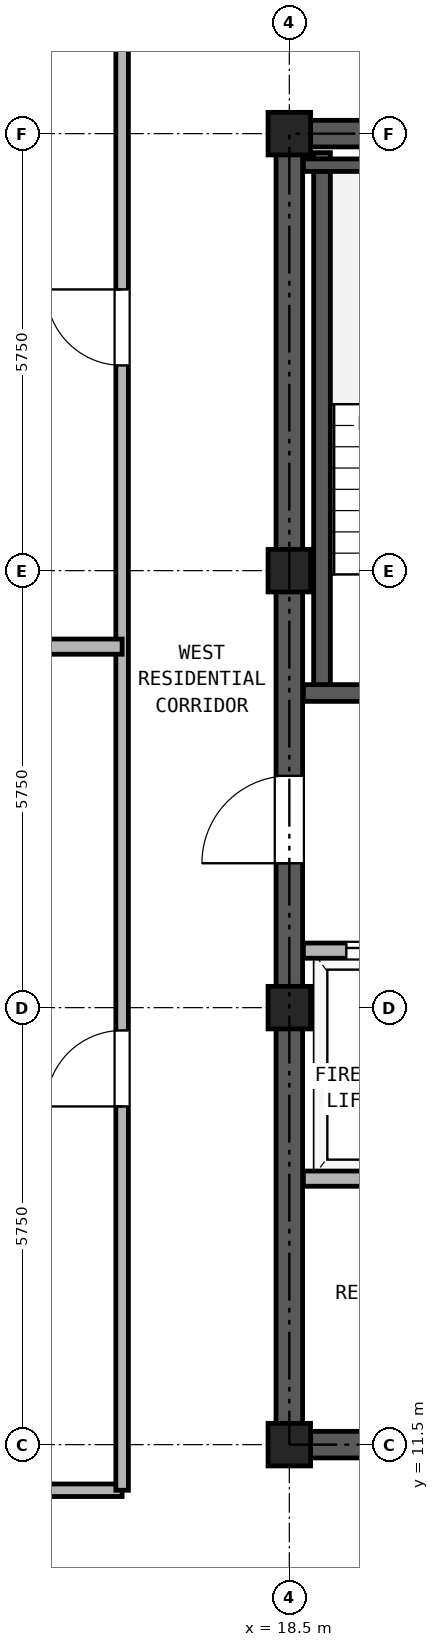
"""IFC4 building model, lengths in metres.
Left out: names, types, materials, properties, quantities, classifications, styles, units other than length and angle.
Written with IfcOpenShell. Run it as: python <this file> out.ifc"""

import sys

from ifc_helpers import new_model, si_unit, direction, frame, frame_2d, origin, origin_2d, place, context, subcontext, project, spatial, rectangle, hollow_rectangle, extrude, source, transform, mapped, element, fill, save


model = new_model("IFC4")
c1 = context("Model", 3, precision=1e-05, world=origin(), true_north=direction((0.0, 1.0)))
c2 = subcontext(c1, "Body", "Model", "MODEL_VIEW")
j1 = project(units=[si_unit("LENGTHUNIT", "METRE"), si_unit("PLANEANGLEUNIT", "RADIAN")], contexts=[c1])
p1 = place(None, origin())
s1 = spatial("IfcSite", under=j1, at=p1, CompositionType="ELEMENT")
p2 = place(p1, origin())
s2 = spatial("IfcBuilding", under=s1, at=p2, CompositionType="ELEMENT")
p3 = place(p2, frame((0.0, 0.0, 223.3)))
s3 = spatial("IfcBuildingStorey", under=s2, at=p3, CompositionType="ELEMENT", Elevation=223.3)
m1 = source(origin(), c2, "Body", "SweptSolid", [
    extrude(hollow_rectangle(XDim=0.56, YDim=0.56, WallThickness=0.03, at=origin_2d()), origin(), (0.0, 0.0, 1.0), 2.98),
])
for number, where, z_axis, x_axis in (
    (1, (18.5, 11.5, 0.0), (0.0, 0.0, 1.0), (1.0, 0.0, 0.0)),
    (2, (18.5, 17.25, 0.0), (0.0, 0.0, 1.0), (1.0, 0.0, 0.0)),
    (3, (18.5, 23.0, 0.0), (0.0, 0.0, 1.0), (1.0, 0.0, 0.0)),
    (4, (18.5, 28.75, 0.0), (0.0, 0.0, 1.0), (1.0, 0.0, 0.0)),
):
    element("IfcColumn", number, at=place(p3, frame(where, z_axis=z_axis, x_axis=x_axis)), inside=s3, PredefinedType="COLUMN", context=c2, shape_type="MappedRepresentation", body=[
        mapped(m1, transform((0.0, 0.0, 0.0), x_axis=(1.0, 0.0, 0.0), y_axis=(0.0, 1.0, 0.0), z_axis=(0.0, 0.0, 1.0), scale=1.0)),
    ])
p4 = place(p3, frame((18.325, 11.5, 0.0), z_axis=(0.0, 0.0, 1.0), x_axis=(1.0, 0.0, 0.0)))
e5 = element("IfcWall", 5, at=p4, inside=s3, PredefinedType="SHEAR", context=c2, shape_type="SweptSolid", body=[
    extrude(rectangle(XDim=10.35, YDim=0.35, at=frame_2d((5.175, 0.0))), origin(), (0.0, 0.0, 1.0), 2.98),
])
p5 = place(p4, frame((1.775, 0.0, 0.0)))
e6 = element("IfcOpeningElement", 6, at=p5, cuts=e5, PredefinedType="OPENING", context=c2, shape_type="SweptSolid", body=[
    extrude(rectangle(XDim=0.95, YDim=2.15, at=frame_2d((0.475, 1.075))), frame((0.0, 0.185, 0.0), z_axis=(0.0, -1.0, 0.0), x_axis=(1.0, 0.0, 0.0)), (0.0, 0.0, 1.0), 0.37),
])
p6 = place(p4, frame((5.275, 0.0, 0.0)))
e7 = element("IfcOpeningElement", 7, at=p6, cuts=e5, PredefinedType="OPENING", context=c2, shape_type="SweptSolid", body=[
    extrude(rectangle(XDim=0.95, YDim=2.15, at=frame_2d((0.475, 1.075))), frame((0.0, 0.185, 0.0), z_axis=(0.0, -1.0, 0.0), x_axis=(1.0, 0.0, 0.0)), (0.0, 0.0, 1.0), 0.37),
])
p7 = place(p4, frame((8.175, 0.0, 0.0)))
e8 = element("IfcOpeningElement", 8, at=p7, cuts=e5, PredefinedType="OPENING", context=c2, shape_type="SweptSolid", body=[
    extrude(rectangle(XDim=1.1, YDim=2.25, at=frame_2d((0.55, 1.125))), frame((0.0, 0.185, 0.0), z_axis=(0.0, -1.0, 0.0), x_axis=(1.0, 0.0, 0.0)), (0.0, 0.0, 1.0), 0.37),
])
p8 = place(p3, frame((18.325, 28.75, 0.0), z_axis=(0.0, 0.0, 1.0), x_axis=(1.0, 0.0, 0.0)))
e9 = element("IfcWall", 9, at=p8, inside=s3, PredefinedType="SHEAR", context=c2, shape_type="SweptSolid", body=[
    extrude(rectangle(XDim=10.35, YDim=0.35, at=frame_2d((5.175, 0.0))), origin(), (0.0, 0.0, 1.0), 2.98),
])
p9 = place(p8, frame((4.055, 0.0, 0.0)))
e10 = element("IfcOpeningElement", 10, at=p9, cuts=e9, PredefinedType="OPENING", context=c2, shape_type="SweptSolid", body=[
    extrude(rectangle(XDim=0.9, YDim=2.05, at=frame_2d((0.45, 1.025))), frame((0.0, 0.185, 0.0), z_axis=(0.0, -1.0, 0.0), x_axis=(1.0, 0.0, 0.0)), (0.0, 0.0, 1.0), 0.37),
])
p10 = place(p8, frame((5.595, 0.0, 0.0)))
e11 = element("IfcOpeningElement", 11, at=p10, cuts=e9, PredefinedType="OPENING", context=c2, shape_type="SweptSolid", body=[
    extrude(rectangle(XDim=0.9, YDim=2.05, at=frame_2d((0.45, 1.025))), frame((0.0, 0.185, 0.0), z_axis=(0.0, -1.0, 0.0), x_axis=(1.0, 0.0, 0.0)), (0.0, 0.0, 1.0), 0.37),
])
p11 = place(p3, frame((18.5, 11.675, 0.0), z_axis=(0.0, 0.0, 1.0), x_axis=(0.0, 1.0, 0.0)))
e12 = element("IfcWall", 12, at=p11, inside=s3, PredefinedType="SHEAR", context=c2, shape_type="SweptSolid", body=[
    extrude(rectangle(XDim=16.9, YDim=0.35, at=frame_2d((8.45, 0.0))), origin(), (0.0, 0.0, 1.0), 2.98),
])
p12 = place(p11, frame((7.475, 0.0, 0.0)))
e13 = element("IfcOpeningElement", 13, at=p12, cuts=e12, PredefinedType="OPENING", context=c2, shape_type="SweptSolid", body=[
    extrude(rectangle(XDim=1.15, YDim=2.2, at=frame_2d((0.575, 1.1))), frame((0.0, 0.185, 0.0), z_axis=(0.0, -1.0, 0.0), x_axis=(1.0, 0.0, 0.0)), (0.0, 0.0, 1.0), 0.37),
])
p13 = place(p3, frame((18.93, 21.39, 0.0), z_axis=(0.0, 0.0, 1.0), x_axis=(0.0, 1.0, 0.0)))
e14 = element("IfcWall", 14, at=p13, inside=s3, PredefinedType="SOLIDWALL", context=c2, shape_type="SweptSolid", body=[
    extrude(rectangle(XDim=7.11, YDim=0.22, at=frame_2d((3.555, 0.0))), origin(), (0.0, 0.0, 1.0), 2.98),
])
p14 = place(p3, frame((18.685, 28.335, 0.0), z_axis=(0.0, 0.0, 1.0), x_axis=(1.0, 0.0, 0.0)))
e15 = element("IfcWall", 15, at=p14, inside=s3, PredefinedType="PARTITIONING", context=c2, shape_type="SweptSolid", body=[
    extrude(rectangle(XDim=3.425, YDim=0.165, at=frame_2d((1.712, 0.0))), origin(), (0.0, 0.0, 1.0), 2.98),
])
p15 = place(p3, frame((18.685, 21.39, 0.0), z_axis=(0.0, 0.0, 1.0), x_axis=(1.0, 0.0, 0.0)))
e16 = element("IfcWall", 16, at=p15, inside=s3, PredefinedType="SOLIDWALL", context=c2, shape_type="SweptSolid", body=[
    extrude(rectangle(XDim=6.445, YDim=0.22, at=frame_2d((3.222, 0.0))), origin(), (0.0, 0.0, 1.0), 2.98),
])
p16 = place(p15, frame((1.165, 0.0, 0.0)))
e17 = element("IfcOpeningElement", 17, at=p16, cuts=e16, PredefinedType="OPENING", context=c2, shape_type="SweptSolid", body=[
    extrude(rectangle(XDim=1.15, YDim=2.2, at=frame_2d((0.575, 1.1))), frame((0.0, 0.12, 0.0), z_axis=(0.0, -1.0, 0.0), x_axis=(1.0, 0.0, 0.0)), (0.0, 0.0, 1.0), 0.24),
])
p17 = place(p15, frame((4.895, 0.0, 0.0)))
e18 = element("IfcOpeningElement", 18, at=p17, cuts=e16, PredefinedType="OPENING", context=c2, shape_type="SweptSolid", body=[
    extrude(rectangle(XDim=1.1, YDim=2.25, at=frame_2d((0.55, 1.125))), frame((0.0, 0.12, 0.0), z_axis=(0.0, -1.0, 0.0), x_axis=(1.0, 0.0, 0.0)), (0.0, 0.0, 1.0), 0.24),
])
p18 = place(p3, frame((18.685, 18.0, 0.0), z_axis=(0.0, 0.0, 1.0), x_axis=(1.0, 0.0, 0.0)))
e19 = element("IfcWall", 19, at=p18, inside=s3, PredefinedType="PARTITIONING", context=c2, shape_type="SweptSolid", body=[
    extrude(rectangle(XDim=9.63, YDim=0.2, at=frame_2d((4.815, 0.0))), origin(), (0.0, 0.0, 1.0), 2.98),
])
p19 = place(p18, frame((0.565, 0.0, 0.0)))
e20 = element("IfcOpeningElement", 20, at=p19, cuts=e19, PredefinedType="OPENING", context=c2, shape_type="SweptSolid", body=[
    extrude(rectangle(XDim=1.3, YDim=2.3, at=frame_2d((0.65, 1.15))), frame((0.0, 0.11, 0.0), z_axis=(0.0, -1.0, 0.0), x_axis=(1.0, 0.0, 0.0)), (0.0, 0.0, 1.0), 0.22),
])
p20 = place(p18, frame((2.665, 0.0, 0.0)))
e21 = element("IfcOpeningElement", 21, at=p20, cuts=e19, PredefinedType="OPENING", context=c2, shape_type="SweptSolid", body=[
    extrude(rectangle(XDim=1.3, YDim=2.3, at=frame_2d((0.65, 1.15))), frame((0.0, 0.11, 0.0), z_axis=(0.0, -1.0, 0.0), x_axis=(1.0, 0.0, 0.0)), (0.0, 0.0, 1.0), 0.22),
])
p21 = place(p18, frame((5.085, 0.0, 0.0)))
e22 = element("IfcOpeningElement", 22, at=p21, cuts=e19, PredefinedType="OPENING", context=c2, shape_type="SweptSolid", body=[
    extrude(rectangle(XDim=0.9, YDim=2.05, at=frame_2d((0.45, 1.025))), frame((0.0, 0.11, 0.0), z_axis=(0.0, -1.0, 0.0), x_axis=(1.0, 0.0, 0.0)), (0.0, 0.0, 1.0), 0.22),
])
p22 = place(p18, frame((8.215, 0.0, 0.0)))
e23 = element("IfcOpeningElement", 23, at=p22, cuts=e19, PredefinedType="OPENING", context=c2, shape_type="SweptSolid", body=[
    extrude(rectangle(XDim=0.9, YDim=2.05, at=frame_2d((0.45, 1.025))), frame((0.0, 0.11, 0.0), z_axis=(0.0, -1.0, 0.0), x_axis=(1.0, 0.0, 0.0)), (0.0, 0.0, 1.0), 0.22),
])
p23 = place(p3, frame((18.685, 15.0, 0.0), z_axis=(0.0, 0.0, 1.0), x_axis=(1.0, 0.0, 0.0)))
e24 = element("IfcWall", 24, at=p23, inside=s3, PredefinedType="PARTITIONING", context=c2, shape_type="SweptSolid", body=[
    extrude(rectangle(XDim=9.63, YDim=0.2, at=frame_2d((4.815, 0.0))), origin(), (0.0, 0.0, 1.0), 2.98),
])
p24 = place(p3, frame((8.56, 10.9, 0.0), z_axis=(0.0, 0.0, 1.0), x_axis=(1.0, 0.0, 0.0)))
e25 = element("IfcWall", 25, at=p24, inside=s3, PredefinedType="PARTITIONING", context=c2, shape_type="SweptSolid", body=[
    extrude(rectangle(XDim=7.74, YDim=0.165, at=frame_2d((3.87, 0.0))), origin(), (0.0, 0.0, 1.0), 2.98),
])
p25 = place(p3, frame((16.3, 10.9, 0.0), z_axis=(0.0, 0.0, 1.0), x_axis=(0.0, 1.0, 0.0)))
e26 = element("IfcWall", 26, at=p25, inside=s3, PredefinedType="PARTITIONING", context=c2, shape_type="SweptSolid", body=[
    extrude(rectangle(XDim=24.24, YDim=0.165, at=frame_2d((12.12, 0.0))), origin(), (0.0, 0.0, 1.0), 2.98),
])
p26 = place(p25, frame((5.05, 0.0, 0.0)))
e27 = element("IfcOpeningElement", 27, at=p26, cuts=e26, PredefinedType="OPENING", context=c2, shape_type="SweptSolid", body=[
    extrude(rectangle(XDim=1.0, YDim=2.15, at=frame_2d((0.5, 1.075))), frame((0.0, 0.093, 0.0), z_axis=(0.0, -1.0, 0.0), x_axis=(1.0, 0.0, 0.0)), (0.0, 0.0, 1.0), 0.185),
])
p27 = place(p25, frame((14.8, 0.0, 0.0)))
e28 = element("IfcOpeningElement", 28, at=p27, cuts=e26, PredefinedType="OPENING", context=c2, shape_type="SweptSolid", body=[
    extrude(rectangle(XDim=1.0, YDim=2.15, at=frame_2d((0.5, 1.075))), frame((0.0, 0.093, 0.0), z_axis=(0.0, -1.0, 0.0), x_axis=(1.0, 0.0, 0.0)), (0.0, 0.0, 1.0), 0.185),
])
p28 = place(p3, frame((5.36, 22.0, 0.0), z_axis=(0.0, 0.0, 1.0), x_axis=(1.0, 0.0, 0.0)))
e29 = element("IfcWall", 29, at=p28, inside=s3, PredefinedType="PARTITIONING", context=c2, shape_type="SweptSolid", body=[
    extrude(rectangle(XDim=10.94, YDim=0.2, at=frame_2d((5.47, 0.0))), origin(), (0.0, 0.0, 1.0), 2.98),
])
p29 = place(p19, origin())
e30 = element("IfcDoor", 30, at=p29, inside=s3, OperationType="DOUBLE_DOOR_SLIDING", PredefinedType="DOOR", context=c2, shape_type="SweptSolid", body=[
    extrude(rectangle(XDim=1.3, YDim=2.3, at=frame_2d((0.65, 1.15))), frame((0.0, 0.025, 0.0), z_axis=(0.0, -1.0, 0.0), x_axis=(1.0, 0.0, 0.0)), (0.0, 0.0, 1.0), 0.05),
])
fill(e20, e30)
p30 = place(p12, frame((1.15, 0.0, 0.0), z_axis=(0.0, 0.0, 1.0), x_axis=(-1.0, 0.0, 0.0)))
e31 = element("IfcDoor", 31, at=p30, inside=s3, OperationType="SINGLE_SWING_LEFT", PredefinedType="DOOR", context=c2, shape_type="SweptSolid", body=[
    extrude(rectangle(XDim=1.15, YDim=2.2, at=frame_2d((0.575, 1.1))), frame((0.0, 0.025, 0.0), z_axis=(0.0, -1.0, 0.0), x_axis=(1.0, 0.0, 0.0)), (0.0, 0.0, 1.0), 0.05),
])
fill(e13, e31)
p31 = place(p26, origin())
e32 = element("IfcDoor", 32, at=p31, inside=s3, OperationType="SINGLE_SWING_LEFT", PredefinedType="DOOR", context=c2, shape_type="SweptSolid", body=[
    extrude(rectangle(XDim=1.0, YDim=2.15, at=frame_2d((0.5, 1.075))), frame((0.0, 0.025, 0.0), z_axis=(0.0, -1.0, 0.0), x_axis=(1.0, 0.0, 0.0)), (0.0, 0.0, 1.0), 0.05),
])
fill(e27, e32)
p32 = place(p27, origin())
e33 = element("IfcDoor", 33, at=p32, inside=s3, OperationType="SINGLE_SWING_RIGHT", PredefinedType="DOOR", context=c2, shape_type="SweptSolid", body=[
    extrude(rectangle(XDim=1.0, YDim=2.15, at=frame_2d((0.5, 1.075))), frame((0.0, 0.025, 0.0), z_axis=(0.0, -1.0, 0.0), x_axis=(1.0, 0.0, 0.0)), (0.0, 0.0, 1.0), 0.05),
])
fill(e28, e33)
save(model, sys.argv[1])
